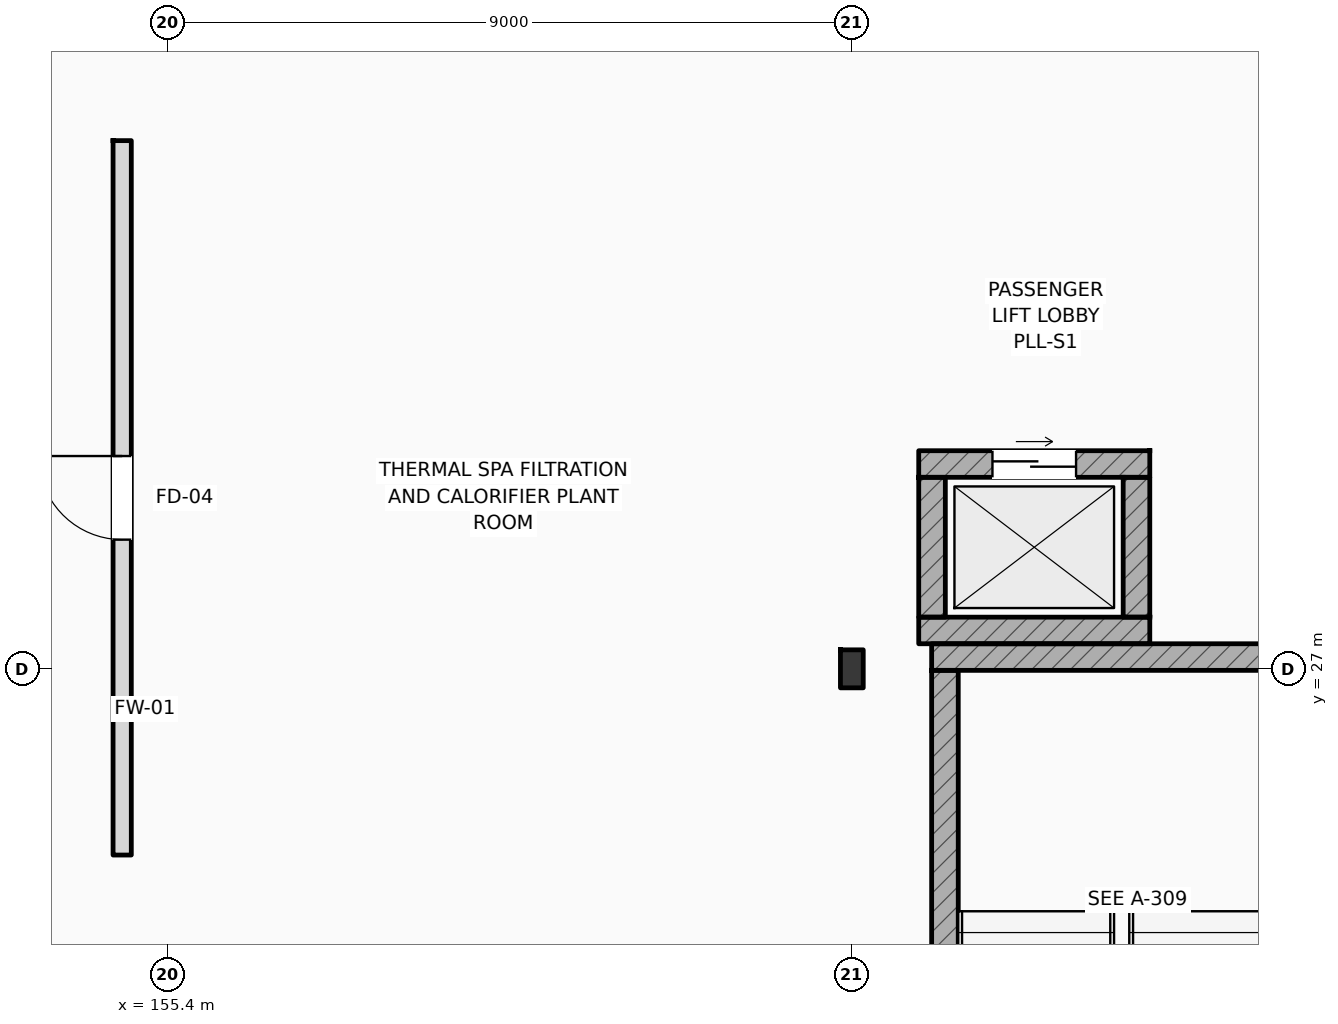
"""IFC4 building model, lengths in metres.
Left out: names, types, materials, properties, quantities, classifications, styles, units other than length and angle.
Written with IfcOpenShell. Run it as: python <this file> out.ifc"""

import sys

from ifc_helpers import new_model, si_unit, direction, frame, frame_2d, origin, origin_2d, place, context, subcontext, project, spatial, rectangle, i_section, extrude, element, fill, save


model = new_model("IFC4")
c1 = context("Model", 3, precision=1e-05, world=origin(), true_north=direction((0.0, 1.0)))
c2 = subcontext(c1, "Body", "Model", "MODEL_VIEW")
j1 = project(units=[si_unit("LENGTHUNIT", "METRE"), si_unit("PLANEANGLEUNIT", "RADIAN")], contexts=[c1])
p1 = place(None, origin())
s1 = spatial("IfcSite", under=j1, at=p1, CompositionType="ELEMENT")
p2 = place(p1, origin())
s2 = spatial("IfcBuilding", under=s1, at=p2, CompositionType="ELEMENT")
p3 = place(p2, frame((0.0, 0.0, -4.5)))
s3 = spatial("IfcBuildingStorey", under=s2, at=p3, CompositionType="ELEMENT", Elevation=-4.5)
p4 = place(p3, frame((164.4, 27.0, 0.0), z_axis=(0.0, 0.0, 1.0), x_axis=(1.0, 0.0, 0.0)))
e1 = element("IfcColumn", 1, at=p4, inside=s3, PredefinedType="COLUMN", context=c2, shape_type="SweptSolid", body=[
    extrude(i_section(OverallWidth=0.3, OverallDepth=0.5, WebThickness=0.014, FlangeThickness=0.028, FilletRadius=0.027, at=origin_2d()), origin(), (0.0, 0.0, 1.0), 4.5),
])
p5 = place(p3, frame((165.45, 27.155, 0.0), z_axis=(0.0, 0.0, 1.0), x_axis=(1.0, 0.0, 0.0)))
e2 = element("IfcWall", 2, at=p5, inside=s3, PredefinedType="SHEAR", context=c2, shape_type="SweptSolid", body=[
    extrude(rectangle(XDim=5.0, YDim=0.35, at=frame_2d((2.5, 0.0))), origin(), (0.0, 0.0, 1.0), 4.5),
])
p6 = place(p3, frame((165.625, 18.4, 0.0), z_axis=(0.0, 0.0, 1.0), x_axis=(0.0, 1.0, 0.0)))
e3 = element("IfcWall", 3, at=p6, inside=s3, PredefinedType="SHEAR", context=c2, shape_type="SweptSolid", body=[
    extrude(rectangle(XDim=8.58, YDim=0.35, at=frame_2d((4.29, 0.0))), origin(), (0.0, 0.0, 1.0), 4.5),
])
p7 = place(p6, frame((0.225, 0.0, 0.0)))
e4 = element("IfcOpeningElement", 4, at=p7, cuts=e3, PredefinedType="OPENING", context=c2, shape_type="SweptSolid", body=[
    extrude(rectangle(XDim=1.6, YDim=2.2, at=frame_2d((0.8, 1.1))), frame((0.0, 0.185, 0.0), z_axis=(0.0, -1.0, 0.0), x_axis=(1.0, 0.0, 0.0)), (0.0, 0.0, 1.0), 0.37),
])
p8 = place(p3, frame((165.28, 29.695, 0.0), z_axis=(0.0, 0.0, 1.0), x_axis=(1.0, 0.0, 0.0)))
e5 = element("IfcWall", 5, at=p8, inside=s3, PredefinedType="SHEAR", context=c2, shape_type="SweptSolid", body=[
    extrude(rectangle(XDim=3.04, YDim=0.35, at=frame_2d((1.52, 0.0))), origin(), (0.0, 0.0, 1.0), 4.1),
])
p9 = place(p8, frame((0.97, 0.0, 0.0)))
e6 = element("IfcOpeningElement", 6, at=p9, cuts=e5, PredefinedType="OPENING", context=c2, shape_type="SweptSolid", body=[
    extrude(rectangle(XDim=1.1, YDim=2.2, at=frame_2d((0.55, 1.1))), frame((0.0, 0.185, 0.0), z_axis=(0.0, -1.0, 0.0), x_axis=(1.0, 0.0, 0.0)), (0.0, 0.0, 1.0), 0.37),
])
p10 = place(p3, frame((165.28, 27.505, 0.0), z_axis=(0.0, 0.0, 1.0), x_axis=(1.0, 0.0, 0.0)))
e7 = element("IfcWall", 7, at=p10, inside=s3, PredefinedType="SHEAR", context=c2, shape_type="SweptSolid", body=[
    extrude(rectangle(XDim=3.04, YDim=0.35, at=frame_2d((1.52, 0.0))), origin(), (0.0, 0.0, 1.0), 4.1),
])
for number, where, z_axis, x_axis in (
    (8, (165.455, 27.68, 0.0), (0.0, 0.0, 1.0), (0.0, 1.0, 0.0)),
    (9, (168.145, 27.68, 0.0), (0.0, 0.0, 1.0), (0.0, 1.0, 0.0)),
):
    element("IfcWall", number, at=place(p3, frame(where, z_axis=z_axis, x_axis=x_axis)), inside=s3, PredefinedType="SHEAR", context=c2, shape_type="SweptSolid", body=[
        extrude(rectangle(XDim=1.84, YDim=0.35, at=frame_2d((0.92, 0.0))), origin(), (0.0, 0.0, 1.0), 4.1),
    ])
p11 = place(p3, frame((154.8, 24.55, 0.0), z_axis=(0.0, 0.0, 1.0), x_axis=(0.0, 1.0, 0.0)))
e10 = element("IfcWall", 10, at=p11, inside=s3, PredefinedType="STANDARD", context=c2, shape_type="SweptSolid", body=[
    extrude(rectangle(XDim=9.4, YDim=0.24, at=frame_2d((4.7, 0.0))), origin(), (0.0, 0.0, 1.0), 4.1),
])
p12 = place(p11, frame((4.15, 0.0, 0.0)))
e11 = element("IfcOpeningElement", 11, at=p12, cuts=e10, PredefinedType="OPENING", context=c2, shape_type="SweptSolid", body=[
    extrude(rectangle(XDim=1.1, YDim=2.2, at=frame_2d((0.55, 1.1))), frame((0.0, 0.13, 0.0), z_axis=(0.0, -1.0, 0.0), x_axis=(1.0, 0.0, 0.0)), (0.0, 0.0, 1.0), 0.26),
])
p13 = place(p9, origin())
e12 = element("IfcDoor", 12, at=p13, inside=s3, OperationType="SLIDING_TO_LEFT", PredefinedType="DOOR", context=c2, shape_type="SweptSolid", body=[
    extrude(rectangle(XDim=1.1, YDim=2.2, at=frame_2d((0.55, 1.1))), frame((0.0, 0.025, 0.0), z_axis=(0.0, -1.0, 0.0), x_axis=(1.0, 0.0, 0.0)), (0.0, 0.0, 1.0), 0.05),
])
fill(e6, e12)
p14 = place(p12, origin())
e13 = element("IfcDoor", 13, at=p14, inside=s3, OperationType="SINGLE_SWING_RIGHT", PredefinedType="DOOR", context=c2, shape_type="SweptSolid", body=[
    extrude(rectangle(XDim=1.1, YDim=2.2, at=frame_2d((0.55, 1.1))), frame((0.0, 0.025, 0.0), z_axis=(0.0, -1.0, 0.0), x_axis=(1.0, 0.0, 0.0)), (0.0, 0.0, 1.0), 0.05),
])
fill(e11, e13)
save(model, sys.argv[1])
